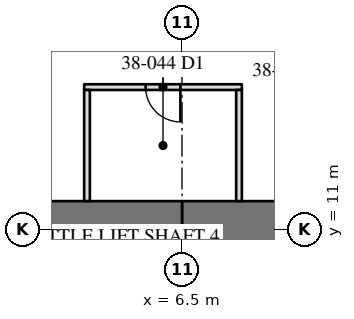
"""IFC4 building model, lengths in metres.
Left out: names, types, materials, properties, quantities, classifications, styles, units other than length and angle.
Written with IfcOpenShell. Run it as: python <this file> out.ifc"""

import sys

from ifc_helpers import new_model, si_unit, direction, frame, frame_2d, origin, place, context, subcontext, project, spatial, rectangle, extrude, element, fill, save


model = new_model("IFC4")
c1 = context("Model", 3, precision=1e-05, world=origin(), true_north=direction((0.0, 1.0)))
c2 = subcontext(c1, "Body", "Model", "MODEL_VIEW")
j1 = project(units=[si_unit("LENGTHUNIT", "METRE"), si_unit("PLANEANGLEUNIT", "RADIAN")], contexts=[c1])
p1 = place(None, origin())
s1 = spatial("IfcSite", under=j1, at=p1, CompositionType="ELEMENT")
p2 = place(p1, origin())
s2 = spatial("IfcBuilding", under=s1, at=p2, CompositionType="ELEMENT")
p3 = place(p2, frame((0.0, 0.0, 162.3)))
s3 = spatial("IfcBuildingStorey", under=s2, at=p3, CompositionType="ELEMENT", Elevation=162.3)
p4 = place(p3, frame((11.0, 11.0, 0.0), z_axis=(0.0, 0.0, 1.0), x_axis=(-1.0, 0.0, 0.0)))
e1 = element("IfcWall", 1, at=p4, inside=s3, PredefinedType="SHEAR", context=c2, shape_type="SweptSolid", body=[
    extrude(rectangle(XDim=4.5, YDim=1.5, at=frame_2d((2.25, 0.0))), origin(), (0.0, 0.0, 1.0), 4.1),
])
p5 = place(p3, frame((6.5, 11.0, 0.0), z_axis=(0.0, 0.0, 1.0), x_axis=(-1.0, 0.0, 0.0)))
e2 = element("IfcWall", 2, at=p5, inside=s3, PredefinedType="SHEAR", context=c2, shape_type="SweptSolid", body=[
    extrude(rectangle(XDim=13.0, YDim=1.5, at=frame_2d((6.5, 0.0))), origin(), (0.0, 0.0, 1.0), 4.1),
])
p6 = place(p3, frame((6.5, 6.5, 0.0), z_axis=(0.0, 0.0, 1.0), x_axis=(0.0, 1.0, 0.0)))
e3 = element("IfcWall", 3, at=p6, inside=s3, PredefinedType="SHEAR", context=c2, shape_type="SweptSolid", body=[
    extrude(rectangle(XDim=4.5, YDim=0.9, at=frame_2d((2.25, 0.0))), origin(), (0.0, 0.0, 1.0), 4.1),
])
p7 = place(p3, frame((8.075, 14.75, 0.0), z_axis=(0.0, 0.0, 1.0), x_axis=(-1.0, 0.0, 0.0)))
e4 = element("IfcWall", 4, at=p7, inside=s3, PredefinedType="PARTITIONING", context=c2, shape_type="SweptSolid", body=[
    extrude(rectangle(XDim=4.15, YDim=0.15, at=frame_2d((2.075, 0.0))), origin(), (0.0, 0.0, 1.0), 3.91),
])
p8 = place(p7, frame((1.617, 0.0, 0.0)))
e5 = element("IfcOpeningElement", 5, at=p8, cuts=e4, PredefinedType="OPENING", context=c2, shape_type="SweptSolid", body=[
    extrude(rectangle(XDim=0.915, YDim=2.134, at=frame_2d((0.458, 1.067))), frame((0.0, 0.085, 0.0), z_axis=(0.0, -1.0, 0.0), x_axis=(1.0, 0.0, 0.0)), (0.0, 0.0, 1.0), 0.17),
])
for number, where, z_axis, x_axis in (
    (6, (8.0, 14.675, 0.0), (0.0, 0.0, 1.0), (0.0, -1.0, 0.0)),
    (7, (4.0, 14.675, 0.0), (0.0, 0.0, 1.0), (0.0, -1.0, 0.0)),
):
    element("IfcWall", number, at=place(p3, frame(where, z_axis=z_axis, x_axis=x_axis)), inside=s3, PredefinedType="PARTITIONING", context=c2, shape_type="SweptSolid", body=[
        extrude(rectangle(XDim=2.925, YDim=0.15, at=frame_2d((1.462, 0.0))), origin(), (0.0, 0.0, 1.0), 3.91),
    ])
p9 = place(p8, origin())
e8 = element("IfcDoor", 8, at=p9, inside=s3, OperationType="SINGLE_SWING_LEFT", PredefinedType="DOOR", context=c2, shape_type="SweptSolid", body=[
    extrude(rectangle(XDim=0.915, YDim=2.134, at=frame_2d((0.458, 1.067))), frame((0.0, 0.025, 0.0), z_axis=(0.0, -1.0, 0.0), x_axis=(1.0, 0.0, 0.0)), (0.0, 0.0, 1.0), 0.05),
])
fill(e5, e8)
save(model, sys.argv[1])
